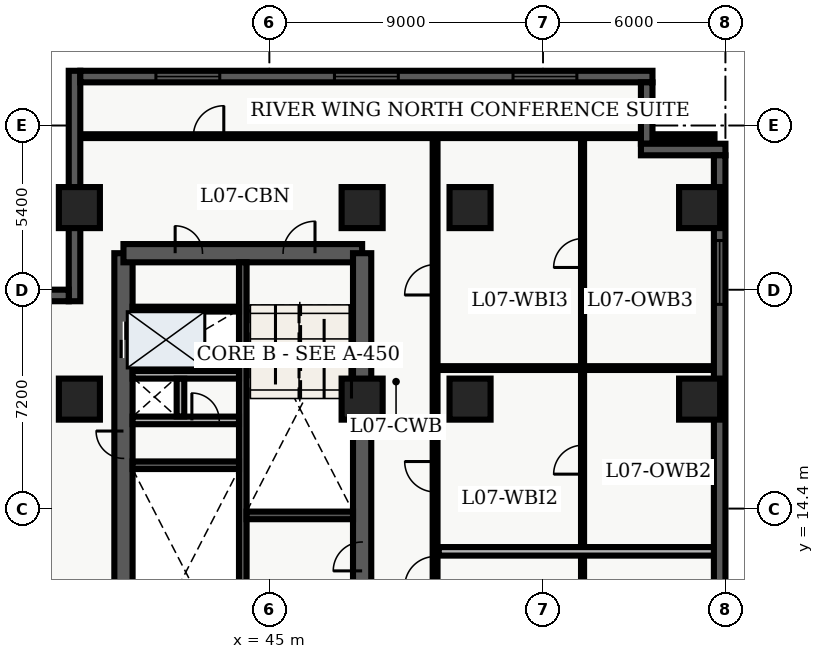
"""IFC4 building model, lengths in metres.
Left out: names, types, materials, properties, quantities, classifications, styles, units other than length and angle.
Written with IfcOpenShell. Run it as: python <this file> out.ifc"""

import sys

from ifc_helpers import new_model, entity, si_unit, converted_unit, direction, frame, origin_with_axes, origin_2d_with_axis, place, context, subcontext, project, spatial, polyline, rectangle, outline, extrude, element, fill, save


model = new_model("IFC4")
c1 = context("Model", 3, precision=1e-05, world=origin_with_axes(), true_north=direction((0.0, 1.0)))
c2 = subcontext(c1, "Body", "Model", "MODEL_VIEW")
j1 = project(units=[si_unit("LENGTHUNIT", "METRE"), converted_unit("PLANEANGLEUNIT", "DEGREE", entity("IfcPlaneAngleMeasure", 0.017), si_unit("PLANEANGLEUNIT", "RADIAN"), dimensions=[0, 0, 0, 0, 0, 0, 0])], contexts=[c1])
p1 = place(None, origin_with_axes())
s1 = spatial("IfcSite", under=j1, at=p1, CompositionType="ELEMENT")
p2 = place(p1, origin_with_axes())
s2 = spatial("IfcBuilding", under=s1, at=p2, CompositionType="ELEMENT")
p3 = place(p2, frame((0.0, 0.0, 32.7), z_axis=(0.0, 0.0, 1.0), x_axis=(1.0, 0.0, 0.0)))
s3 = spatial("IfcBuildingStorey", under=s2, at=p3, CompositionType="ELEMENT", Elevation=32.7)
p4 = place(p3, frame((40.2, 7.2, 0.0), z_axis=(0.0, 0.0, 1.0), x_axis=(0.0, 1.0, 0.0)))
e1 = element("IfcWall", 1, at=p4, inside=s3, PredefinedType="SHEAR", context=c2, shape_type="SweptSolid", body=[
    extrude(outline(polyline([(0.0, -0.3), (15.6, -0.3), (15.6, 0.3), (0.0, 0.3), (0.0, -0.3)])), origin_with_axes(), (0.0, 0.0, 1.0), 3.66),
])
p5 = place(p4, frame((12.75, 0.0, 0.0), z_axis=(0.0, 0.0, 1.0), x_axis=(1.0, 0.0, 0.0)))
e2 = element("IfcOpeningElement", 2, at=p5, cuts=e1, PredefinedType="OPENING", context=c2, shape_type="SweptSolid", body=[
    extrude(rectangle(XDim=1.2, YDim=0.62, at=origin_2d_with_axis()), origin_with_axes(), (0.0, 0.0, 1.0), 2.15),
])
p6 = place(p4, frame((9.3, 0.0, 0.0), z_axis=(0.0, 0.0, 1.0), x_axis=(1.0, 0.0, 0.0)))
e3 = element("IfcOpeningElement", 3, at=p6, cuts=e1, PredefinedType="OPENING", context=c2, shape_type="SweptSolid", body=[
    extrude(rectangle(XDim=0.9, YDim=0.62, at=origin_2d_with_axis()), origin_with_axes(), (0.0, 0.0, 1.0), 2.15),
])
p7 = place(p3, frame((40.2, 22.8, 0.0), z_axis=(0.0, 0.0, 1.0), x_axis=(1.0, 0.0, 0.0)))
e4 = element("IfcWall", 4, at=p7, inside=s3, PredefinedType="SHEAR", context=c2, shape_type="SweptSolid", body=[
    extrude(outline(polyline([(0.0, -0.3), (7.85, -0.3), (7.85, 0.3), (0.0, 0.3), (0.0, -0.3)])), origin_with_axes(), (0.0, 0.0, 1.0), 3.66),
])
p8 = place(p7, frame((5.775, 0.0, 0.0), z_axis=(0.0, 0.0, 1.0), x_axis=(1.0, 0.0, 0.0)))
e5 = element("IfcOpeningElement", 5, at=p8, cuts=e4, PredefinedType="OPENING", context=c2, shape_type="SweptSolid", body=[
    extrude(rectangle(XDim=1.05, YDim=0.62, at=origin_2d_with_axis()), origin_with_axes(), (0.0, 0.0, 1.0), 2.15),
])
p9 = place(p7, frame((2.15, 0.0, 0.0), z_axis=(0.0, 0.0, 1.0), x_axis=(1.0, 0.0, 0.0)))
e6 = element("IfcOpeningElement", 6, at=p9, cuts=e4, PredefinedType="OPENING", context=c2, shape_type="SweptSolid", body=[
    extrude(rectangle(XDim=0.9, YDim=0.62, at=origin_2d_with_axis()), origin_with_axes(), (0.0, 0.0, 1.0), 2.15),
])
p10 = place(p3, frame((48.05, 7.2, 0.0), z_axis=(0.0, 0.0, 1.0), x_axis=(0.0, 1.0, 0.0)))
e7 = element("IfcWall", 7, at=p10, inside=s3, PredefinedType="SHEAR", context=c2, shape_type="SweptSolid", body=[
    extrude(outline(polyline([(0.0, -0.3), (15.6, -0.3), (15.6, 0.3), (0.0, 0.3), (0.0, -0.3)])), origin_with_axes(), (0.0, 0.0, 1.0), 3.66),
])
p11 = place(p10, frame((1.425, 0.0, 0.0), z_axis=(0.0, 0.0, 1.0), x_axis=(1.0, 0.0, 0.0)))
e8 = element("IfcOpeningElement", 8, at=p11, cuts=e7, PredefinedType="OPENING", context=c2, shape_type="SweptSolid", body=[
    extrude(rectangle(XDim=1.05, YDim=0.62, at=origin_2d_with_axis()), origin_with_axes(), (0.0, 0.0, 1.0), 2.15),
])
p12 = place(p10, frame((3.475, 0.0, 0.0), z_axis=(0.0, 0.0, 1.0), x_axis=(1.0, 0.0, 0.0)))
e9 = element("IfcOpeningElement", 9, at=p12, cuts=e7, PredefinedType="OPENING", context=c2, shape_type="SweptSolid", body=[
    extrude(rectangle(XDim=1.05, YDim=0.62, at=origin_2d_with_axis()), origin_with_axes(), (0.0, 0.0, 1.0), 2.15),
])
p13 = place(p10, frame((5.625, 0.0, 0.0), z_axis=(0.0, 0.0, 1.0), x_axis=(1.0, 0.0, 0.0)))
e10 = element("IfcOpeningElement", 10, at=p13, cuts=e7, PredefinedType="OPENING", context=c2, shape_type="SweptSolid", body=[
    extrude(rectangle(XDim=0.95, YDim=0.62, at=origin_2d_with_axis()), origin_with_axes(), (0.0, 0.0, 1.0), 2.15),
])
p14 = place(p3, frame((44.125, 7.5, 0.0), z_axis=(0.0, 0.0, 1.0), x_axis=(0.0, 1.0, 0.0)))
e11 = element("IfcWall", 11, at=p14, inside=s3, PredefinedType="SHEAR", context=c2, shape_type="SweptSolid", body=[
    extrude(outline(polyline([(0.0, -0.125), (15.0, -0.125), (15.0, 0.125), (0.0, 0.125), (0.0, -0.125)])), origin_with_axes(), (0.0, 0.0, 1.0), 3.66),
])
for number, where, z_axis, x_axis in (
    (12, (40.5, 15.825, 0.0), (0.0, 0.0, 1.0), (1.0, 0.0, 0.0)),
    (13, (44.25, 14.175, 0.0), (0.0, 0.0, 1.0), (1.0, 0.0, 0.0)),
):
    element("IfcWall", number, at=place(p3, frame(where, z_axis=z_axis, x_axis=x_axis)), inside=s3, PredefinedType="SHEAR", context=c2, shape_type="SweptSolid", body=[
        extrude(outline(polyline([(0.0, -0.125), (3.5, -0.125), (3.5, 0.125), (0.0, 0.125), (0.0, -0.125)])), origin_with_axes(), (0.0, 0.0, 1.0), 3.66),
    ])
p15 = place(p3, frame((40.5, 17.3, 0.0), z_axis=(0.0, 0.0, 1.0), x_axis=(1.0, 0.0, 0.0)))
e14 = element("IfcWall", 14, at=p15, inside=s3, PredefinedType="SOLIDWALL", context=c2, shape_type="SweptSolid", body=[
    extrude(outline(polyline([(0.0, -0.125), (3.5, -0.125), (3.5, 0.125), (0.0, 0.125), (0.0, -0.125)])), origin_with_axes(), (0.0, 0.0, 1.0), 2.7),
])
p16 = place(p15, frame((2.4, 0.0, 0.0), z_axis=(0.0, 0.0, 1.0), x_axis=(1.0, 0.0, 0.0)))
e15 = element("IfcOpeningElement", 15, at=p16, cuts=e14, PredefinedType="OPENING", context=c2, shape_type="SweptSolid", body=[
    extrude(rectangle(XDim=0.9, YDim=0.27, at=origin_2d_with_axis()), origin_with_axes(), (0.0, 0.0, 1.0), 2.15),
])
p17 = place(p3, frame((40.5, 18.8, 0.0), z_axis=(0.0, 0.0, 1.0), x_axis=(1.0, 0.0, 0.0)))
e16 = element("IfcWall", 16, at=p17, inside=s3, PredefinedType="SOLIDWALL", context=c2, shape_type="SweptSolid", body=[
    extrude(outline(polyline([(0.0, -0.125), (3.5, -0.125), (3.5, 0.125), (0.0, 0.125), (0.0, -0.125)])), origin_with_axes(), (0.0, 0.0, 1.0), 2.7),
])
p18 = place(p3, frame((42.075, 17.43, 0.0), z_axis=(0.0, 0.0, 1.0), x_axis=(0.0, 1.0, 0.0)))
e17 = element("IfcWall", 17, at=p18, inside=s3, PredefinedType="SOLIDWALL", context=c2, shape_type="SweptSolid", body=[
    extrude(outline(polyline([(0.0, -0.125), (1.24, -0.125), (1.24, 0.125), (0.0, 0.125), (0.0, -0.125)])), origin_with_axes(), (0.0, 0.0, 1.0), 2.7),
])
for number, where, z_axis, x_axis in (
    (18, (38.75, 18.0, 0.0), (0.0, 0.0, 1.0), (1.0, 0.0, 0.0)),
    (19, (38.75, 24.3, 0.0), (0.0, 0.0, 1.0), (1.0, 0.0, 0.0)),
    (20, (48.05, 18.0, 0.0), (0.0, 0.0, 1.0), (1.0, 0.0, 0.0)),
    (21, (48.05, 24.3, 0.0), (0.0, 0.0, 1.0), (1.0, 0.0, 0.0)),
    (22, (51.6, 18.0, 0.0), (0.0, 0.0, 1.0), (1.0, 0.0, 0.0)),
    (23, (51.6, 24.3, 0.0), (0.0, 0.0, 1.0), (1.0, 0.0, 0.0)),
    (24, (59.15, 18.0, 0.0), (0.0, 0.0, 1.0), (1.0, 0.0, 0.0)),
    (25, (59.15, 24.3, 0.0), (0.0, 0.0, 1.0), (1.0, 0.0, 0.0)),
):
    element("IfcColumn", number, at=place(p3, frame(where, z_axis=z_axis, x_axis=x_axis)), inside=s3, PredefinedType="COLUMN", context=c2, shape_type="SweptSolid", body=[
        extrude(rectangle(XDim=1.35, YDim=1.35, at=origin_2d_with_axis()), origin_with_axes(), (0.0, 0.0, 1.0), 3.9),
    ])
p19 = place(p3, frame((40.5, 20.96, 0.0), z_axis=(0.0, 0.0, 1.0), x_axis=(1.0, 0.0, 0.0)))
e26 = element("IfcWall", 26, at=p19, inside=s3, PredefinedType="PARTITIONING", context=c2, shape_type="SweptSolid", body=[
    extrude(outline(polyline([(0.0, -0.08), (3.5, -0.08), (3.5, 0.08), (0.0, 0.08), (0.0, -0.08)])), origin_with_axes(), (0.0, 0.0, 1.0), 2.7),
])
p20 = place(p3, frame((50.45, 7.85, 0.0), z_axis=(0.0, 0.0, 1.0), x_axis=(0.0, 1.0, 0.0)))
e27 = element("IfcWall", 27, at=p20, inside=s3, PredefinedType="PARTITIONING", context=c2, shape_type="SweptSolid", body=[
    extrude(outline(polyline([(0.0, -0.08), (18.8, -0.08), (18.8, 0.08), (0.0, 0.08), (0.0, -0.08)])), origin_with_axes(), (0.0, 0.0, 1.0), 2.7),
])
p21 = place(p20, frame((4.473, 0.0, 0.0), z_axis=(0.0, 0.0, 1.0), x_axis=(1.0, 0.0, 0.0)))
e28 = element("IfcOpeningElement", 28, at=p21, cuts=e27, PredefinedType="OPENING", context=c2, shape_type="SweptSolid", body=[
    extrude(rectangle(XDim=1.0, YDim=0.18, at=origin_2d_with_axis()), origin_with_axes(), (0.0, 0.0, 1.0), 2.15),
])
p22 = place(p20, frame((7.597, 0.0, 0.0), z_axis=(0.0, 0.0, 1.0), x_axis=(1.0, 0.0, 0.0)))
e29 = element("IfcOpeningElement", 29, at=p22, cuts=e27, PredefinedType="OPENING", context=c2, shape_type="SweptSolid", body=[
    extrude(rectangle(XDim=1.0, YDim=0.18, at=origin_2d_with_axis()), origin_with_axes(), (0.0, 0.0, 1.0), 2.15),
])
p23 = place(p20, frame((14.075, 0.0, 0.0), z_axis=(0.0, 0.0, 1.0), x_axis=(1.0, 0.0, 0.0)))
e30 = element("IfcOpeningElement", 30, at=p23, cuts=e27, PredefinedType="OPENING", context=c2, shape_type="SweptSolid", body=[
    extrude(rectangle(XDim=1.0, YDim=0.18, at=origin_2d_with_axis()), origin_with_axes(), (0.0, 0.0, 1.0), 2.15),
])
p24 = place(p3, frame((38.76, 26.65, 0.0), z_axis=(0.0, 0.0, 1.0), x_axis=(1.0, 0.0, 0.0)))
e31 = element("IfcWall", 31, at=p24, inside=s3, PredefinedType="PARTITIONING", context=c2, shape_type="SweptSolid", body=[
    extrude(outline(polyline([(0.0, -0.062), (20.88, -0.062), (20.88, 0.062), (0.0, 0.062), (0.0, -0.062)])), origin_with_axes(), (0.0, 0.0, 1.0), 2.7),
])
p25 = place(p24, frame((4.24, 0.0, 0.0), z_axis=(0.0, 0.0, 1.0), x_axis=(1.0, 0.0, 0.0)))
e32 = element("IfcOpeningElement", 32, at=p25, cuts=e31, PredefinedType="OPENING", context=c2, shape_type="SweptSolid", body=[
    extrude(rectangle(XDim=1.0, YDim=0.145, at=origin_2d_with_axis()), origin_with_axes(), (0.0, 0.0, 1.0), 2.15),
])
p26 = place(p3, frame((55.3, 7.98, 0.0), z_axis=(0.0, 0.0, 1.0), x_axis=(0.0, 1.0, 0.0)))
e33 = element("IfcWall", 33, at=p26, inside=s3, PredefinedType="PARTITIONING", context=c2, shape_type="SweptSolid", body=[
    extrude(outline(polyline([(0.0, -0.05), (18.54, -0.05), (18.54, 0.05), (0.0, 0.05), (0.0, -0.05)])), origin_with_axes(), (0.0, 0.0, 1.0), 2.7),
])
p27 = place(p26, frame((2.471, 0.0, 0.0), z_axis=(0.0, 0.0, 1.0), x_axis=(1.0, 0.0, 0.0)))
e34 = element("IfcOpeningElement", 34, at=p27, cuts=e33, PredefinedType="OPENING", context=c2, shape_type="SweptSolid", body=[
    extrude(rectangle(XDim=0.95, YDim=0.12, at=origin_2d_with_axis()), origin_with_axes(), (0.0, 0.0, 1.0), 2.15),
])
p28 = place(p26, frame((8.027, 0.0, 0.0), z_axis=(0.0, 0.0, 1.0), x_axis=(1.0, 0.0, 0.0)))
e35 = element("IfcOpeningElement", 35, at=p28, cuts=e33, PredefinedType="OPENING", context=c2, shape_type="SweptSolid", body=[
    extrude(rectangle(XDim=0.95, YDim=0.12, at=origin_2d_with_axis()), origin_with_axes(), (0.0, 0.0, 1.0), 2.15),
])
p29 = place(p26, frame((14.825, 0.0, 0.0), z_axis=(0.0, 0.0, 1.0), x_axis=(1.0, 0.0, 0.0)))
e36 = element("IfcOpeningElement", 36, at=p29, cuts=e33, PredefinedType="OPENING", context=c2, shape_type="SweptSolid", body=[
    extrude(rectangle(XDim=0.95, YDim=0.12, at=origin_2d_with_axis()), origin_with_axes(), (0.0, 0.0, 1.0), 2.15),
])
p30 = place(p3, frame((50.57, 12.993, 0.0), z_axis=(0.0, 0.0, 1.0), x_axis=(1.0, 0.0, 0.0)))
e37 = element("IfcWall", 37, at=p30, inside=s3, PredefinedType="PARTITIONING", context=c2, shape_type="SweptSolid", body=[
    extrude(outline(polyline([(0.0, -0.14), (9.055, -0.14), (9.055, 0.14), (0.0, 0.14), (0.0, -0.14)])), origin_with_axes(), (0.0, 0.0, 1.0), 2.7),
])
p31 = place(p3, frame((50.57, 19.021, 0.0), z_axis=(0.0, 0.0, 1.0), x_axis=(1.0, 0.0, 0.0)))
e38 = element("IfcWall", 38, at=p31, inside=s3, PredefinedType="PARTITIONING", context=c2, shape_type="SweptSolid", body=[
    extrude(outline(polyline([(0.0, -0.062), (9.055, -0.062), (9.055, 0.062), (0.0, 0.062), (0.0, -0.062)])), origin_with_axes(), (0.0, 0.0, 1.0), 2.7),
])
p32 = place(p3, frame((38.59, 21.22, 0.0), z_axis=(0.0, 0.0, 1.0), x_axis=(0.0, 1.0, 0.0)))
e39 = element("IfcWall", 39, at=p32, inside=s3, PredefinedType="SOLIDWALL", context=c2, shape_type="SweptSolid", body=[
    extrude(outline(polyline([(0.0, -0.19), (7.58, -0.19), (7.58, 0.19), (0.0, 0.19), (0.0, -0.19)])), origin_with_axes(), (0.0, 0.0, 1.0), 3.66),
])
p33 = place(p3, frame((38.78, 28.61, 0.0), z_axis=(0.0, 0.0, 1.0), x_axis=(1.0, 0.0, 0.0)))
e40 = element("IfcWall", 40, at=p33, inside=s3, PredefinedType="SOLIDWALL", context=c2, shape_type="SweptSolid", body=[
    extrude(outline(polyline([(0.0, -0.19), (18.82, -0.19), (18.82, 0.19), (0.0, 0.19), (0.0, -0.19)])), origin_with_axes(), (0.0, 0.0, 1.0), 3.66),
])
p34 = place(p33, frame((3.537, 0.0, 0.45), z_axis=(0.0, 0.0, 1.0), x_axis=(1.0, 0.0, 0.0)))
e41 = element("IfcOpeningElement", 41, at=p34, cuts=e40, PredefinedType="OPENING", context=c2, shape_type="SweptSolid", body=[
    extrude(rectangle(XDim=2.1, YDim=0.4, at=origin_2d_with_axis()), origin_with_axes(), (0.0, 0.0, 1.0), 2.2),
])
p35 = place(p33, frame((9.41, 0.0, 0.45), z_axis=(0.0, 0.0, 1.0), x_axis=(1.0, 0.0, 0.0)))
e42 = element("IfcOpeningElement", 42, at=p35, cuts=e40, PredefinedType="OPENING", context=c2, shape_type="SweptSolid", body=[
    extrude(rectangle(XDim=2.1, YDim=0.4, at=origin_2d_with_axis()), origin_with_axes(), (0.0, 0.0, 1.0), 2.2),
])
p36 = place(p33, frame((15.283, 0.0, 0.45), z_axis=(0.0, 0.0, 1.0), x_axis=(1.0, 0.0, 0.0)))
e43 = element("IfcOpeningElement", 43, at=p36, cuts=e40, PredefinedType="OPENING", context=c2, shape_type="SweptSolid", body=[
    extrude(rectangle(XDim=2.1, YDim=0.4, at=origin_2d_with_axis()), origin_with_axes(), (0.0, 0.0, 1.0), 2.2),
])
p37 = place(p3, frame((57.41, 28.42, 0.0), z_axis=(0.0, 0.0, 1.0), x_axis=(0.0, -1.0, 0.0)))
e44 = element("IfcWall", 44, at=p37, inside=s3, PredefinedType="SOLIDWALL", context=c2, shape_type="SweptSolid", body=[
    extrude(outline(polyline([(0.0, -0.19), (2.02, -0.19), (2.02, 0.19), (0.0, 0.19), (0.0, -0.19)])), origin_with_axes(), (0.0, 0.0, 1.0), 3.66),
])
p38 = place(p3, frame((57.22, 26.21, 0.0), z_axis=(0.0, 0.0, 1.0), x_axis=(1.0, 0.0, 0.0)))
e45 = element("IfcWall", 45, at=p38, inside=s3, PredefinedType="SOLIDWALL", context=c2, shape_type="SweptSolid", body=[
    extrude(outline(polyline([(0.0, -0.19), (2.78, -0.19), (2.78, 0.19), (0.0, 0.19), (0.0, -0.19)])), origin_with_axes(), (0.0, 0.0, 1.0), 3.66),
])
p39 = place(p3, frame((59.81, 26.02, 0.0), z_axis=(0.0, 0.0, 1.0), x_axis=(0.0, -1.0, 0.0)))
e46 = element("IfcWall", 46, at=p39, inside=s3, PredefinedType="SOLIDWALL", context=c2, shape_type="SweptSolid", body=[
    extrude(outline(polyline([(0.0, -0.19), (23.62, -0.19), (23.62, 0.19), (0.0, 0.19), (0.0, -0.19)])), origin_with_axes(), (0.0, 0.0, 1.0), 3.66),
])
p40 = place(p39, frame((3.853, 0.0, 0.45), z_axis=(0.0, 0.0, 1.0), x_axis=(1.0, 0.0, 0.0)))
e47 = element("IfcOpeningElement", 47, at=p40, cuts=e46, PredefinedType="OPENING", context=c2, shape_type="SweptSolid", body=[
    extrude(rectangle(XDim=2.1, YDim=0.4, at=origin_2d_with_axis()), origin_with_axes(), (0.0, 0.0, 1.0), 2.2),
])
p41 = place(p39, frame((20.218, 0.0, 0.45), z_axis=(0.0, 0.0, 1.0), x_axis=(1.0, 0.0, 0.0)))
e48 = element("IfcOpeningElement", 48, at=p41, cuts=e46, PredefinedType="OPENING", context=c2, shape_type="SweptSolid", body=[
    extrude(rectangle(XDim=2.1, YDim=0.4, at=origin_2d_with_axis()), origin_with_axes(), (0.0, 0.0, 1.0), 2.2),
])
p42 = place(p3, frame((21.22, 21.41, 0.0), z_axis=(0.0, 0.0, 1.0), x_axis=(1.0, 0.0, 0.0)))
e49 = element("IfcWall", 49, at=p42, inside=s3, PredefinedType="SOLIDWALL", context=c2, shape_type="SweptSolid", body=[
    extrude(outline(polyline([(0.0, -0.19), (17.18, -0.19), (17.18, 0.19), (0.0, 0.19), (0.0, -0.19)])), origin_with_axes(), (0.0, 0.0, 1.0), 3.66),
])
p43 = place(p42, frame((3.263, 0.0, 0.45), z_axis=(0.0, 0.0, 1.0), x_axis=(1.0, 0.0, 0.0)))
e50 = element("IfcOpeningElement", 50, at=p43, cuts=e49, PredefinedType="OPENING", context=c2, shape_type="SweptSolid", body=[
    extrude(rectangle(XDim=2.1, YDim=0.4, at=origin_2d_with_axis()), origin_with_axes(), (0.0, 0.0, 1.0), 2.2),
])
p44 = place(p42, frame((8.59, 0.0, 0.45), z_axis=(0.0, 0.0, 1.0), x_axis=(1.0, 0.0, 0.0)))
e51 = element("IfcOpeningElement", 51, at=p44, cuts=e49, PredefinedType="OPENING", context=c2, shape_type="SweptSolid", body=[
    extrude(rectangle(XDim=2.1, YDim=0.4, at=origin_2d_with_axis()), origin_with_axes(), (0.0, 0.0, 1.0), 2.2),
])
p45 = place(p42, frame((13.467, 0.0, 0.45), z_axis=(0.0, 0.0, 1.0), x_axis=(1.0, 0.0, 0.0)))
e52 = element("IfcOpeningElement", 52, at=p45, cuts=e49, PredefinedType="OPENING", context=c2, shape_type="SweptSolid", body=[
    extrude(rectangle(XDim=2.1, YDim=0.4, at=origin_2d_with_axis()), origin_with_axes(), (0.0, 0.0, 1.0), 2.2),
])
p46 = place(p4, frame((12.75, 0.0, 0.0), z_axis=(0.0, 0.0, 1.0), x_axis=(1.0, 0.0, 0.0)))
e53 = element("IfcDoor", 53, at=p46, inside=s3, OperationType="DOUBLE_DOOR_SLIDING", PredefinedType="DOOR", context=c2, shape_type="SweptSolid", body=[
    extrude(rectangle(XDim=1.2, YDim=0.09, at=origin_2d_with_axis()), origin_with_axes(), (0.0, 0.0, 1.0), 2.15),
])
fill(e2, e53)
p47 = place(p4, frame((9.3, 0.0, 0.0), z_axis=(0.0, 0.0, 1.0), x_axis=(1.0, 0.0, 0.0)))
e54 = element("IfcDoor", 54, at=p47, inside=s3, OperationType="SINGLE_SWING_RIGHT", PredefinedType="DOOR", context=c2, shape_type="SweptSolid", body=[
    extrude(rectangle(XDim=0.9, YDim=0.09, at=origin_2d_with_axis()), origin_with_axes(), (0.0, 0.0, 1.0), 2.15),
])
fill(e3, e54)
p48 = place(p15, frame((2.4, 0.0, 0.0), z_axis=(0.0, 0.0, 1.0), x_axis=(1.0, 0.0, 0.0)))
e55 = element("IfcDoor", 55, at=p48, inside=s3, OperationType="SINGLE_SWING_LEFT", PredefinedType="DOOR", context=c2, shape_type="SweptSolid", body=[
    extrude(rectangle(XDim=0.9, YDim=0.09, at=origin_2d_with_axis()), origin_with_axes(), (0.0, 0.0, 1.0), 2.15),
])
fill(e15, e55)
p49 = place(p7, frame((5.775, 0.0, 0.0), z_axis=(0.0, 0.0, 1.0), x_axis=(1.0, 0.0, 0.0)))
e56 = element("IfcDoor", 56, at=p49, inside=s3, OperationType="SINGLE_SWING_RIGHT", PredefinedType="DOOR", context=c2, shape_type="SweptSolid", body=[
    extrude(rectangle(XDim=1.05, YDim=0.09, at=origin_2d_with_axis()), origin_with_axes(), (0.0, 0.0, 1.0), 2.15),
])
fill(e5, e56)
p50 = place(p7, frame((2.15, 0.0, 0.0), z_axis=(0.0, 0.0, 1.0), x_axis=(1.0, 0.0, 0.0)))
e57 = element("IfcDoor", 57, at=p50, inside=s3, OperationType="SINGLE_SWING_LEFT", PredefinedType="DOOR", context=c2, shape_type="SweptSolid", body=[
    extrude(rectangle(XDim=0.9, YDim=0.09, at=origin_2d_with_axis()), origin_with_axes(), (0.0, 0.0, 1.0), 2.15),
])
fill(e6, e57)
p51 = place(p10, frame((5.625, 0.0, 0.0), z_axis=(0.0, 0.0, 1.0), x_axis=(1.0, 0.0, 0.0)))
e58 = element("IfcDoor", 58, at=p51, inside=s3, OperationType="SINGLE_SWING_LEFT", PredefinedType="DOOR", context=c2, shape_type="SweptSolid", body=[
    extrude(rectangle(XDim=0.95, YDim=0.09, at=origin_2d_with_axis()), origin_with_axes(), (0.0, 0.0, 1.0), 2.15),
])
fill(e10, e58)
p52 = place(p24, frame((4.24, 0.0, 0.0), z_axis=(0.0, 0.0, 1.0), x_axis=(1.0, 0.0, 0.0)))
e59 = element("IfcDoor", 59, at=p52, inside=s3, OperationType="SINGLE_SWING_RIGHT", PredefinedType="DOOR", context=c2, shape_type="SweptSolid", body=[
    extrude(rectangle(XDim=1.0, YDim=0.075, at=origin_2d_with_axis()), origin_with_axes(), (0.0, 0.0, 1.0), 2.15),
])
fill(e32, e59)
p53 = place(p20, frame((4.473, 0.0, 0.0), z_axis=(0.0, 0.0, 1.0), x_axis=(1.0, 0.0, 0.0)))
e60 = element("IfcDoor", 60, at=p53, inside=s3, OperationType="SINGLE_SWING_LEFT", PredefinedType="DOOR", context=c2, shape_type="SweptSolid", body=[
    extrude(rectangle(XDim=1.0, YDim=0.09, at=origin_2d_with_axis()), origin_with_axes(), (0.0, 0.0, 1.0), 2.15),
])
fill(e28, e60)
p54 = place(p26, frame((8.027, 0.0, 0.0), z_axis=(0.0, 0.0, 1.0), x_axis=(1.0, 0.0, 0.0)))
e61 = element("IfcDoor", 61, at=p54, inside=s3, OperationType="SINGLE_SWING_LEFT", PredefinedType="DOOR", context=c2, shape_type="SweptSolid", body=[
    extrude(rectangle(XDim=0.95, YDim=0.06, at=origin_2d_with_axis()), origin_with_axes(), (0.0, 0.0, 1.0), 2.15),
])
fill(e35, e61)
p55 = place(p20, frame((7.597, 0.0, 0.0), z_axis=(0.0, 0.0, 1.0), x_axis=(1.0, 0.0, 0.0)))
e62 = element("IfcDoor", 62, at=p55, inside=s3, OperationType="SINGLE_SWING_RIGHT", PredefinedType="DOOR", context=c2, shape_type="SweptSolid", body=[
    extrude(rectangle(XDim=1.0, YDim=0.09, at=origin_2d_with_axis()), origin_with_axes(), (0.0, 0.0, 1.0), 2.15),
])
fill(e29, e62)
p56 = place(p26, frame((14.825, 0.0, 0.0), z_axis=(0.0, 0.0, 1.0), x_axis=(1.0, 0.0, 0.0)))
e63 = element("IfcDoor", 63, at=p56, inside=s3, OperationType="SINGLE_SWING_LEFT", PredefinedType="DOOR", context=c2, shape_type="SweptSolid", body=[
    extrude(rectangle(XDim=0.95, YDim=0.06, at=origin_2d_with_axis()), origin_with_axes(), (0.0, 0.0, 1.0), 2.15),
])
fill(e36, e63)
p57 = place(p20, frame((14.075, 0.0, 0.0), z_axis=(0.0, 0.0, 1.0), x_axis=(1.0, 0.0, 0.0)))
e64 = element("IfcDoor", 64, at=p57, inside=s3, OperationType="SINGLE_SWING_LEFT", PredefinedType="DOOR", context=c2, shape_type="SweptSolid", body=[
    extrude(rectangle(XDim=1.0, YDim=0.09, at=origin_2d_with_axis()), origin_with_axes(), (0.0, 0.0, 1.0), 2.15),
])
fill(e30, e64)
p58 = place(p33, frame((3.537, 0.0, 0.45), z_axis=(0.0, 0.0, 1.0), x_axis=(1.0, 0.0, 0.0)))
e65 = element("IfcWindow", 65, at=p58, inside=s3, PredefinedType="WINDOW", context=c2, shape_type="SweptSolid", body=[
    extrude(rectangle(XDim=2.1, YDim=0.09, at=origin_2d_with_axis()), origin_with_axes(), (0.0, 0.0, 1.0), 2.2),
])
fill(e41, e65)
p59 = place(p33, frame((9.41, 0.0, 0.45), z_axis=(0.0, 0.0, 1.0), x_axis=(1.0, 0.0, 0.0)))
e66 = element("IfcWindow", 66, at=p59, inside=s3, PredefinedType="WINDOW", context=c2, shape_type="SweptSolid", body=[
    extrude(rectangle(XDim=2.1, YDim=0.09, at=origin_2d_with_axis()), origin_with_axes(), (0.0, 0.0, 1.0), 2.2),
])
fill(e42, e66)
p60 = place(p33, frame((15.283, 0.0, 0.45), z_axis=(0.0, 0.0, 1.0), x_axis=(1.0, 0.0, 0.0)))
e67 = element("IfcWindow", 67, at=p60, inside=s3, PredefinedType="WINDOW", context=c2, shape_type="SweptSolid", body=[
    extrude(rectangle(XDim=2.1, YDim=0.09, at=origin_2d_with_axis()), origin_with_axes(), (0.0, 0.0, 1.0), 2.2),
])
fill(e43, e67)
p61 = place(p39, frame((3.853, 0.0, 0.45), z_axis=(0.0, 0.0, 1.0), x_axis=(1.0, 0.0, 0.0)))
e68 = element("IfcWindow", 68, at=p61, inside=s3, PredefinedType="WINDOW", context=c2, shape_type="SweptSolid", body=[
    extrude(rectangle(XDim=2.1, YDim=0.09, at=origin_2d_with_axis()), origin_with_axes(), (0.0, 0.0, 1.0), 2.2),
])
fill(e47, e68)
save(model, sys.argv[1])
